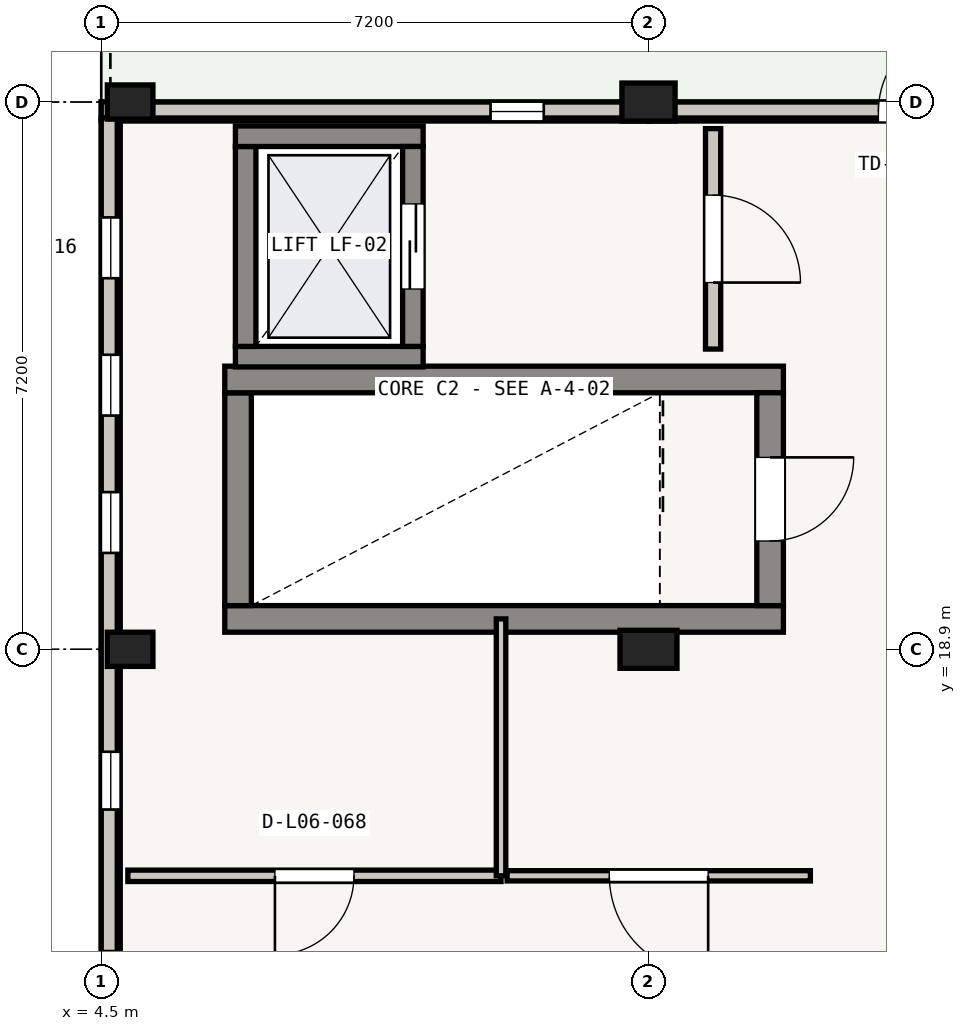
"""IFC4 building model, lengths in metres.
Left out: names, types, materials, properties, quantities, classifications, styles, units other than length and angle.
Written with IfcOpenShell. Run it as: python <this file> out.ifc"""

import sys

from ifc_helpers import new_model, si_unit, direction, frame, frame_2d, origin, origin_2d, place, context, subcontext, project, spatial, rectangle, extrude, element, fill, save


model = new_model("IFC4")
c1 = context("Model", 3, precision=1e-05, world=origin(), true_north=direction((0.0, 1.0)))
c2 = subcontext(c1, "Body", "Model", "MODEL_VIEW")
j1 = project(units=[si_unit("LENGTHUNIT", "METRE"), si_unit("PLANEANGLEUNIT", "RADIAN")], contexts=[c1])
p1 = place(None, origin())
s1 = spatial("IfcSite", under=j1, at=p1, CompositionType="ELEMENT")
p2 = place(p1, origin())
s2 = spatial("IfcBuilding", under=s1, at=p2, CompositionType="ELEMENT")
p3 = place(p2, frame((0.0, 0.0, 25.05)))
s3 = spatial("IfcBuildingStorey", under=s2, at=p3, CompositionType="ELEMENT", Elevation=25.05)
for number, where, z_axis, x_axis in (
    (1, (4.88, 18.9, 0.0), (0.0, 0.0, 1.0), (1.0, 0.0, 0.0)),
    (2, (4.88, 26.1, 0.0), (0.0, 0.0, 1.0), (1.0, 0.0, 0.0)),
):
    element("IfcColumn", number, at=place(p3, frame(where, z_axis=z_axis, x_axis=x_axis)), inside=s3, PredefinedType="COLUMN", context=c2, shape_type="SweptSolid", body=[
        extrude(rectangle(XDim=0.6, YDim=0.45, at=origin_2d()), origin(), (0.0, 0.0, 1.0), 3.66),
    ])
p4 = place(p3, frame((11.7, 18.9, 0.0), z_axis=(0.0, 0.0, 1.0), x_axis=(1.0, 0.0, 0.0)))
e3 = element("IfcColumn", 3, at=p4, inside=s3, PredefinedType="COLUMN", context=c2, shape_type="SweptSolid", body=[
    extrude(rectangle(XDim=0.75, YDim=0.5, at=origin_2d()), origin(), (0.0, 0.0, 1.0), 3.66),
])
p5 = place(p3, frame((11.7, 26.1, 0.0), z_axis=(0.0, 0.0, 1.0), x_axis=(1.0, 0.0, 0.0)))
e4 = element("IfcColumn", 4, at=p5, inside=s3, PredefinedType="COLUMN", context=c2, shape_type="SweptSolid", body=[
    extrude(rectangle(XDim=0.7, YDim=0.5, at=origin_2d()), origin(), (0.0, 0.0, 1.0), 3.66),
])
p6 = place(p3, frame((4.5, 25.975, 0.0), z_axis=(0.0, 0.0, 1.0), x_axis=(1.0, 0.0, 0.0)))
e5 = element("IfcWall", 5, at=p6, inside=s3, PredefinedType="STANDARD", context=c2, shape_type="SweptSolid", body=[
    extrude(rectangle(XDim=7.2, YDim=0.25, at=frame_2d((3.6, 0.0))), origin(), (0.0, 0.0, 1.0), 3.145),
])
p7 = place(p6, frame((5.122, 0.0, 0.55)))
e6 = element("IfcOpeningElement", 6, at=p7, cuts=e5, PredefinedType="OPENING", context=c2, shape_type="SweptSolid", body=[
    extrude(rectangle(XDim=0.7, YDim=2.3, at=frame_2d((0.35, 1.15))), frame((0.0, 0.125, 0.0), z_axis=(0.0, -1.0, 0.0), x_axis=(1.0, 0.0, 0.0)), (0.0, 0.0, 1.0), 0.25),
])
p8 = place(p3, frame((11.7, 25.975, 0.0), z_axis=(0.0, 0.0, 1.0), x_axis=(1.0, 0.0, 0.0)))
e7 = element("IfcWall", 7, at=p8, inside=s3, PredefinedType="STANDARD", context=c2, shape_type="SweptSolid", body=[
    extrude(rectangle(XDim=7.2, YDim=0.25, at=frame_2d((3.6, 0.0))), origin(), (0.0, 0.0, 1.0), 3.195),
])
p9 = place(p8, frame((3.025, 0.0, 0.19)))
e8 = element("IfcOpeningElement", 8, at=p9, cuts=e7, PredefinedType="OPENING", context=c2, shape_type="SweptSolid", body=[
    extrude(rectangle(XDim=1.15, YDim=2.02, at=frame_2d((0.575, 1.01))), frame((0.0, 0.125, 0.0), z_axis=(0.0, -1.0, 0.0), x_axis=(1.0, 0.0, 0.0)), (0.0, 0.0, 1.0), 0.25),
])
p10 = place(p3, frame((4.625, 11.7, 0.0), z_axis=(0.0, 0.0, 1.0), x_axis=(0.0, 1.0, 0.0)))
e9 = element("IfcWall", 9, at=p10, inside=s3, PredefinedType="STANDARD", context=c2, shape_type="SweptSolid", body=[
    extrude(rectangle(XDim=7.2, YDim=0.25, at=frame_2d((3.6, 0.0))), origin(), (0.0, 0.0, 1.0), 3.065),
])
p11 = place(p10, frame((1.348, 0.0, 0.55)))
e10 = element("IfcOpeningElement", 10, at=p11, cuts=e9, PredefinedType="OPENING", context=c2, shape_type="SweptSolid", body=[
    extrude(rectangle(XDim=0.76, YDim=2.16, at=frame_2d((0.38, 1.08))), frame((0.0, 0.125, 0.0), z_axis=(0.0, -1.0, 0.0), x_axis=(1.0, 0.0, 0.0)), (0.0, 0.0, 1.0), 0.25),
])
p12 = place(p10, frame((2.47, 0.0, 0.55)))
e11 = element("IfcOpeningElement", 11, at=p12, cuts=e9, PredefinedType="OPENING", context=c2, shape_type="SweptSolid", body=[
    extrude(rectangle(XDim=0.76, YDim=2.16, at=frame_2d((0.38, 1.08))), frame((0.0, 0.125, 0.0), z_axis=(0.0, -1.0, 0.0), x_axis=(1.0, 0.0, 0.0)), (0.0, 0.0, 1.0), 0.25),
])
p13 = place(p10, frame((5.092, 0.0, 0.55)))
e12 = element("IfcOpeningElement", 12, at=p13, cuts=e9, PredefinedType="OPENING", context=c2, shape_type="SweptSolid", body=[
    extrude(rectangle(XDim=0.76, YDim=2.16, at=frame_2d((0.38, 1.08))), frame((0.0, 0.125, 0.0), z_axis=(0.0, -1.0, 0.0), x_axis=(1.0, 0.0, 0.0)), (0.0, 0.0, 1.0), 0.25),
])
p14 = place(p3, frame((4.625, 18.9, 0.0), z_axis=(0.0, 0.0, 1.0), x_axis=(0.0, 1.0, 0.0)))
e13 = element("IfcWall", 13, at=p14, inside=s3, PredefinedType="STANDARD", context=c2, shape_type="SweptSolid", body=[
    extrude(rectangle(XDim=6.95, YDim=0.25, at=frame_2d((3.475, 0.0))), origin(), (0.0, 0.0, 1.0), 3.095),
])
p15 = place(p14, frame((1.268, 0.0, 0.55)))
e14 = element("IfcOpeningElement", 14, at=p15, cuts=e13, PredefinedType="OPENING", context=c2, shape_type="SweptSolid", body=[
    extrude(rectangle(XDim=0.8, YDim=2.16, at=frame_2d((0.4, 1.08))), frame((0.0, 0.125, 0.0), z_axis=(0.0, -1.0, 0.0), x_axis=(1.0, 0.0, 0.0)), (0.0, 0.0, 1.0), 0.25),
])
p16 = place(p14, frame((3.075, 0.0, 0.55)))
e15 = element("IfcOpeningElement", 15, at=p16, cuts=e13, PredefinedType="OPENING", context=c2, shape_type="SweptSolid", body=[
    extrude(rectangle(XDim=0.8, YDim=2.16, at=frame_2d((0.4, 1.08))), frame((0.0, 0.125, 0.0), z_axis=(0.0, -1.0, 0.0), x_axis=(1.0, 0.0, 0.0)), (0.0, 0.0, 1.0), 0.25),
])
p17 = place(p14, frame((4.882, 0.0, 0.55)))
e16 = element("IfcOpeningElement", 16, at=p17, cuts=e13, PredefinedType="OPENING", context=c2, shape_type="SweptSolid", body=[
    extrude(rectangle(XDim=0.8, YDim=2.16, at=frame_2d((0.4, 1.08))), frame((0.0, 0.125, 0.0), z_axis=(0.0, -1.0, 0.0), x_axis=(1.0, 0.0, 0.0)), (0.0, 0.0, 1.0), 0.25),
])
p18 = place(p3, frame((4.5, 25.995, 3.9), z_axis=(0.0, 0.0, 1.0), x_axis=(1.0, 0.0, 0.0)))
e17 = element("IfcWall", 17, at=p18, inside=s3, PredefinedType="PARAPET", context=c2, shape_type="SweptSolid", body=[
    extrude(rectangle(XDim=14.4, YDim=0.21, at=frame_2d((7.2, 0.0))), origin(), (0.0, 0.0, 1.0), 1.1),
])
p19 = place(p3, frame((4.605, 4.71, 3.9), z_axis=(0.0, 0.0, 1.0), x_axis=(0.0, 1.0, 0.0)))
e18 = element("IfcWall", 18, at=p19, inside=s3, PredefinedType="PARAPET", context=c2, shape_type="SweptSolid", body=[
    extrude(rectangle(XDim=21.18, YDim=0.21, at=frame_2d((10.59, 0.0))), origin(), (0.0, 0.0, 1.0), 1.1),
])
p20 = place(p3, frame((13.475, 19.3, 0.0), z_axis=(0.0, 0.0, 1.0), x_axis=(-1.0, 0.0, 0.0)))
e19 = element("IfcWall", 19, at=p20, inside=s3, PredefinedType="SHEAR", context=c2, shape_type="SweptSolid", body=[
    extrude(rectangle(XDim=7.35, YDim=0.35, at=frame_2d((3.675, 0.0))), origin(), (0.0, 0.0, 1.0), 3.62),
])
p21 = place(p3, frame((6.3, 19.475, 0.0), z_axis=(0.0, 0.0, 1.0), x_axis=(0.0, 1.0, 0.0)))
e20 = element("IfcWall", 20, at=p21, inside=s3, PredefinedType="SHEAR", context=c2, shape_type="SweptSolid", body=[
    extrude(rectangle(XDim=2.8, YDim=0.35, at=frame_2d((1.4, 0.0))), origin(), (0.0, 0.0, 1.0), 3.62),
])
p22 = place(p3, frame((6.125, 22.45, 0.0), z_axis=(0.0, 0.0, 1.0), x_axis=(1.0, 0.0, 0.0)))
e21 = element("IfcWall", 21, at=p22, inside=s3, PredefinedType="SHEAR", context=c2, shape_type="SweptSolid", body=[
    extrude(rectangle(XDim=7.35, YDim=0.35, at=frame_2d((3.675, 0.0))), origin(), (0.0, 0.0, 1.0), 3.62),
])
p23 = place(p3, frame((13.3, 22.275, 0.0), z_axis=(0.0, 0.0, 1.0), x_axis=(0.0, -1.0, 0.0)))
e22 = element("IfcWall", 22, at=p23, inside=s3, PredefinedType="SHEAR", context=c2, shape_type="SweptSolid", body=[
    extrude(rectangle(XDim=2.8, YDim=0.35, at=frame_2d((1.4, 0.0))), origin(), (0.0, 0.0, 1.0), 3.62),
])
p24 = place(p23, frame((0.85, 0.0, 0.0)))
e23 = element("IfcOpeningElement", 23, at=p24, cuts=e22, PredefinedType="OPENING", context=c2, shape_type="SweptSolid", body=[
    extrude(rectangle(XDim=1.1, YDim=2.05, at=frame_2d((0.55, 1.025))), frame((0.0, 0.175, 0.0), z_axis=(0.0, -1.0, 0.0), x_axis=(1.0, 0.0, 0.0)), (0.0, 0.0, 1.0), 0.35),
])
p25 = place(p3, frame((8.735, 22.75, 0.0), z_axis=(0.0, 0.0, 1.0), x_axis=(-1.0, 0.0, 0.0)))
e24 = element("IfcWall", 24, at=p25, inside=s3, PredefinedType="SHEAR", context=c2, shape_type="SweptSolid", body=[
    extrude(rectangle(XDim=2.47, YDim=0.27, at=frame_2d((1.235, 0.0))), origin(), (0.0, 0.0, 1.0), 3.62),
])
p26 = place(p3, frame((6.4, 22.885, 0.0), z_axis=(0.0, 0.0, 1.0), x_axis=(0.0, 1.0, 0.0)))
e25 = element("IfcWall", 25, at=p26, inside=s3, PredefinedType="SHEAR", context=c2, shape_type="SweptSolid", body=[
    extrude(rectangle(XDim=2.63, YDim=0.27, at=frame_2d((1.315, 0.0))), origin(), (0.0, 0.0, 1.0), 3.62),
])
p27 = place(p3, frame((6.265, 25.65, 0.0), z_axis=(0.0, 0.0, 1.0), x_axis=(1.0, 0.0, 0.0)))
e26 = element("IfcWall", 26, at=p27, inside=s3, PredefinedType="SHEAR", context=c2, shape_type="SweptSolid", body=[
    extrude(rectangle(XDim=2.47, YDim=0.27, at=frame_2d((1.235, 0.0))), origin(), (0.0, 0.0, 1.0), 3.62),
])
p28 = place(p3, frame((8.6, 25.515, 0.0), z_axis=(0.0, 0.0, 1.0), x_axis=(0.0, -1.0, 0.0)))
e27 = element("IfcWall", 27, at=p28, inside=s3, PredefinedType="SHEAR", context=c2, shape_type="SweptSolid", body=[
    extrude(rectangle(XDim=2.63, YDim=0.27, at=frame_2d((1.315, 0.0))), origin(), (0.0, 0.0, 1.0), 3.62),
])
p29 = place(p28, frame((0.755, 0.0, 0.0)))
e28 = element("IfcOpeningElement", 28, at=p29, cuts=e27, PredefinedType="OPENING", context=c2, shape_type="SweptSolid", body=[
    extrude(rectangle(XDim=1.12, YDim=2.1, at=frame_2d((0.56, 1.05))), frame((0.0, 0.135, 0.0), z_axis=(0.0, -1.0, 0.0), x_axis=(1.0, 0.0, 0.0)), (0.0, 0.0, 1.0), 0.27),
])
p30 = place(p3, frame((12.55, 25.75, 0.0), z_axis=(0.0, 0.0, 1.0), x_axis=(0.0, -1.0, 0.0)))
e29 = element("IfcWall", 29, at=p30, inside=s3, PredefinedType="SOLIDWALL", context=c2, shape_type="SweptSolid", body=[
    extrude(rectangle(XDim=2.9, YDim=0.2, at=frame_2d((1.45, 0.0))), origin(), (0.0, 0.0, 1.0), 2.64),
])
p31 = place(p30, frame((0.875, 0.0, 0.0)))
e30 = element("IfcOpeningElement", 30, at=p31, cuts=e29, PredefinedType="OPENING", context=c2, shape_type="SweptSolid", body=[
    extrude(rectangle(XDim=1.15, YDim=2.05, at=frame_2d((0.575, 1.025))), frame((0.0, 0.1, 0.0), z_axis=(0.0, -1.0, 0.0), x_axis=(1.0, 0.0, 0.0)), (0.0, 0.0, 1.0), 0.2),
])
p32 = place(p3, frame((9.76, 15.92, 0.0), z_axis=(0.0, 0.0, 1.0), x_axis=(-1.0, 0.0, 0.0)))
e31 = element("IfcWall", 31, at=p32, inside=s3, PredefinedType="PARTITIONING", context=c2, shape_type="SweptSolid", body=[
    extrude(rectangle(XDim=4.91, YDim=0.15, at=frame_2d((2.455, 0.0))), origin(), (0.0, 0.0, 1.0), 2.64),
])
p33 = place(p32, frame((1.935, 0.0, 0.0)))
e32 = element("IfcOpeningElement", 32, at=p33, cuts=e31, PredefinedType="OPENING", context=c2, shape_type="SweptSolid", body=[
    extrude(rectangle(XDim=1.04, YDim=2.05, at=frame_2d((0.52, 1.025))), frame((0.0, 0.075, 0.0), z_axis=(0.0, -1.0, 0.0), x_axis=(1.0, 0.0, 0.0)), (0.0, 0.0, 1.0), 0.15),
])
p34 = place(p3, frame((9.76, 19.3, 0.0), z_axis=(0.0, 0.0, 1.0), x_axis=(0.0, -1.0, 0.0)))
e33 = element("IfcWall", 33, at=p34, inside=s3, PredefinedType="PARTITIONING", context=c2, shape_type="SweptSolid", body=[
    extrude(rectangle(XDim=3.38, YDim=0.125, at=frame_2d((1.69, 0.0))), origin(), (0.0, 0.0, 1.0), 2.64),
])
p35 = place(p3, frame((13.83, 15.92, 0.0), z_axis=(0.0, 0.0, 1.0), x_axis=(-1.0, 0.0, 0.0)))
e34 = element("IfcWall", 34, at=p35, inside=s3, PredefinedType="MOVABLE", context=c2, shape_type="SweptSolid", body=[
    extrude(rectangle(XDim=3.99, YDim=0.135, at=frame_2d((1.995, 0.0))), origin(), (0.0, 0.0, 1.0), 2.64),
])
p36 = place(p35, frame((1.345, 0.0, 0.0)))
e35 = element("IfcOpeningElement", 35, at=p36, cuts=e34, PredefinedType="OPENING", context=c2, shape_type="SweptSolid", body=[
    extrude(rectangle(XDim=1.3, YDim=2.1, at=frame_2d((0.65, 1.05))), frame((0.0, 0.067, 0.0), z_axis=(0.0, -1.0, 0.0), x_axis=(1.0, 0.0, 0.0)), (0.0, 0.0, 1.0), 0.135),
])
p37 = place(p7, origin())
e36 = element("IfcWindow", 36, at=p37, inside=s3, PartitioningType="SINGLE_PANEL", PredefinedType="WINDOW", context=c2, shape_type="SweptSolid", body=[
    extrude(rectangle(XDim=0.7, YDim=2.3, at=frame_2d((0.35, 1.15))), frame((0.0, 0.03, 0.0), z_axis=(0.0, -1.0, 0.0), x_axis=(1.0, 0.0, 0.0)), (0.0, 0.0, 1.0), 0.06),
])
fill(e6, e36)
p38 = place(p9, origin())
e37 = element("IfcDoor", 37, at=p38, inside=s3, OperationType="SINGLE_SWING_RIGHT", PredefinedType="DOOR", context=c2, shape_type="SweptSolid", body=[
    extrude(rectangle(XDim=1.15, YDim=2.02, at=frame_2d((0.575, 1.01))), frame((0.0, 0.025, 0.0), z_axis=(0.0, -1.0, 0.0), x_axis=(1.0, 0.0, 0.0)), (0.0, 0.0, 1.0), 0.05),
])
fill(e8, e37)
p39 = place(p12, origin())
e38 = element("IfcWindow", 38, at=p39, inside=s3, PartitioningType="SINGLE_PANEL", PredefinedType="WINDOW", context=c2, shape_type="SweptSolid", body=[
    extrude(rectangle(XDim=0.76, YDim=2.16, at=frame_2d((0.38, 1.08))), frame((0.0, 0.03, 0.0), z_axis=(0.0, -1.0, 0.0), x_axis=(1.0, 0.0, 0.0)), (0.0, 0.0, 1.0), 0.06),
])
fill(e11, e38)
p40 = place(p13, origin())
e39 = element("IfcWindow", 39, at=p40, inside=s3, PartitioningType="SINGLE_PANEL", PredefinedType="WINDOW", context=c2, shape_type="SweptSolid", body=[
    extrude(rectangle(XDim=0.76, YDim=2.16, at=frame_2d((0.38, 1.08))), frame((0.0, 0.03, 0.0), z_axis=(0.0, -1.0, 0.0), x_axis=(1.0, 0.0, 0.0)), (0.0, 0.0, 1.0), 0.06),
])
fill(e12, e39)
p41 = place(p15, origin())
e40 = element("IfcWindow", 40, at=p41, inside=s3, PartitioningType="SINGLE_PANEL", PredefinedType="WINDOW", context=c2, shape_type="SweptSolid", body=[
    extrude(rectangle(XDim=0.8, YDim=2.16, at=frame_2d((0.4, 1.08))), frame((0.0, 0.03, 0.0), z_axis=(0.0, -1.0, 0.0), x_axis=(1.0, 0.0, 0.0)), (0.0, 0.0, 1.0), 0.06),
])
fill(e14, e40)
p42 = place(p16, origin())
e41 = element("IfcWindow", 41, at=p42, inside=s3, PartitioningType="SINGLE_PANEL", PredefinedType="WINDOW", context=c2, shape_type="SweptSolid", body=[
    extrude(rectangle(XDim=0.8, YDim=2.16, at=frame_2d((0.4, 1.08))), frame((0.0, 0.03, 0.0), z_axis=(0.0, -1.0, 0.0), x_axis=(1.0, 0.0, 0.0)), (0.0, 0.0, 1.0), 0.06),
])
fill(e15, e41)
p43 = place(p17, origin())
e42 = element("IfcWindow", 42, at=p43, inside=s3, PartitioningType="SINGLE_PANEL", PredefinedType="WINDOW", context=c2, shape_type="SweptSolid", body=[
    extrude(rectangle(XDim=0.8, YDim=2.16, at=frame_2d((0.4, 1.08))), frame((0.0, 0.03, 0.0), z_axis=(0.0, -1.0, 0.0), x_axis=(1.0, 0.0, 0.0)), (0.0, 0.0, 1.0), 0.06),
])
fill(e16, e42)
p44 = place(p24, origin())
e43 = element("IfcDoor", 43, at=p44, inside=s3, OperationType="SINGLE_SWING_LEFT", PredefinedType="DOOR", context=c2, shape_type="SweptSolid", body=[
    extrude(rectangle(XDim=1.1, YDim=2.05, at=frame_2d((0.55, 1.025))), frame((0.0, 0.025, 0.0), z_axis=(0.0, -1.0, 0.0), x_axis=(1.0, 0.0, 0.0)), (0.0, 0.0, 1.0), 0.05),
])
fill(e23, e43)
p45 = place(p29, origin())
e44 = element("IfcDoor", 44, at=p45, inside=s3, OperationType="DOUBLE_DOOR_SLIDING", PredefinedType="DOOR", context=c2, shape_type="SweptSolid", body=[
    extrude(rectangle(XDim=1.12, YDim=2.1, at=frame_2d((0.56, 1.05))), frame((0.0, 0.025, 0.0), z_axis=(0.0, -1.0, 0.0), x_axis=(1.0, 0.0, 0.0)), (0.0, 0.0, 1.0), 0.05),
])
fill(e28, e44)
p46 = place(p31, origin())
e45 = element("IfcDoor", 45, at=p46, inside=s3, OperationType="SINGLE_SWING_RIGHT", PredefinedType="DOOR", context=c2, shape_type="SweptSolid", body=[
    extrude(rectangle(XDim=1.15, YDim=2.05, at=frame_2d((0.575, 1.025))), frame((0.0, 0.025, 0.0), z_axis=(0.0, -1.0, 0.0), x_axis=(1.0, 0.0, 0.0)), (0.0, 0.0, 1.0), 0.05),
])
fill(e30, e45)
p47 = place(p33, origin())
e46 = element("IfcDoor", 46, at=p47, inside=s3, OperationType="SINGLE_SWING_RIGHT", PredefinedType="DOOR", context=c2, shape_type="SweptSolid", body=[
    extrude(rectangle(XDim=1.04, YDim=2.05, at=frame_2d((0.52, 1.025))), frame((0.0, 0.025, 0.0), z_axis=(0.0, -1.0, 0.0), x_axis=(1.0, 0.0, 0.0)), (0.0, 0.0, 1.0), 0.05),
])
fill(e32, e46)
p48 = place(p36, origin())
e47 = element("IfcDoor", 47, at=p48, inside=s3, OperationType="SINGLE_SWING_LEFT", PredefinedType="DOOR", context=c2, shape_type="SweptSolid", body=[
    extrude(rectangle(XDim=1.3, YDim=2.1, at=frame_2d((0.65, 1.05))), frame((0.0, 0.025, 0.0), z_axis=(0.0, -1.0, 0.0), x_axis=(1.0, 0.0, 0.0)), (0.0, 0.0, 1.0), 0.05),
])
fill(e35, e47)
save(model, sys.argv[1])
